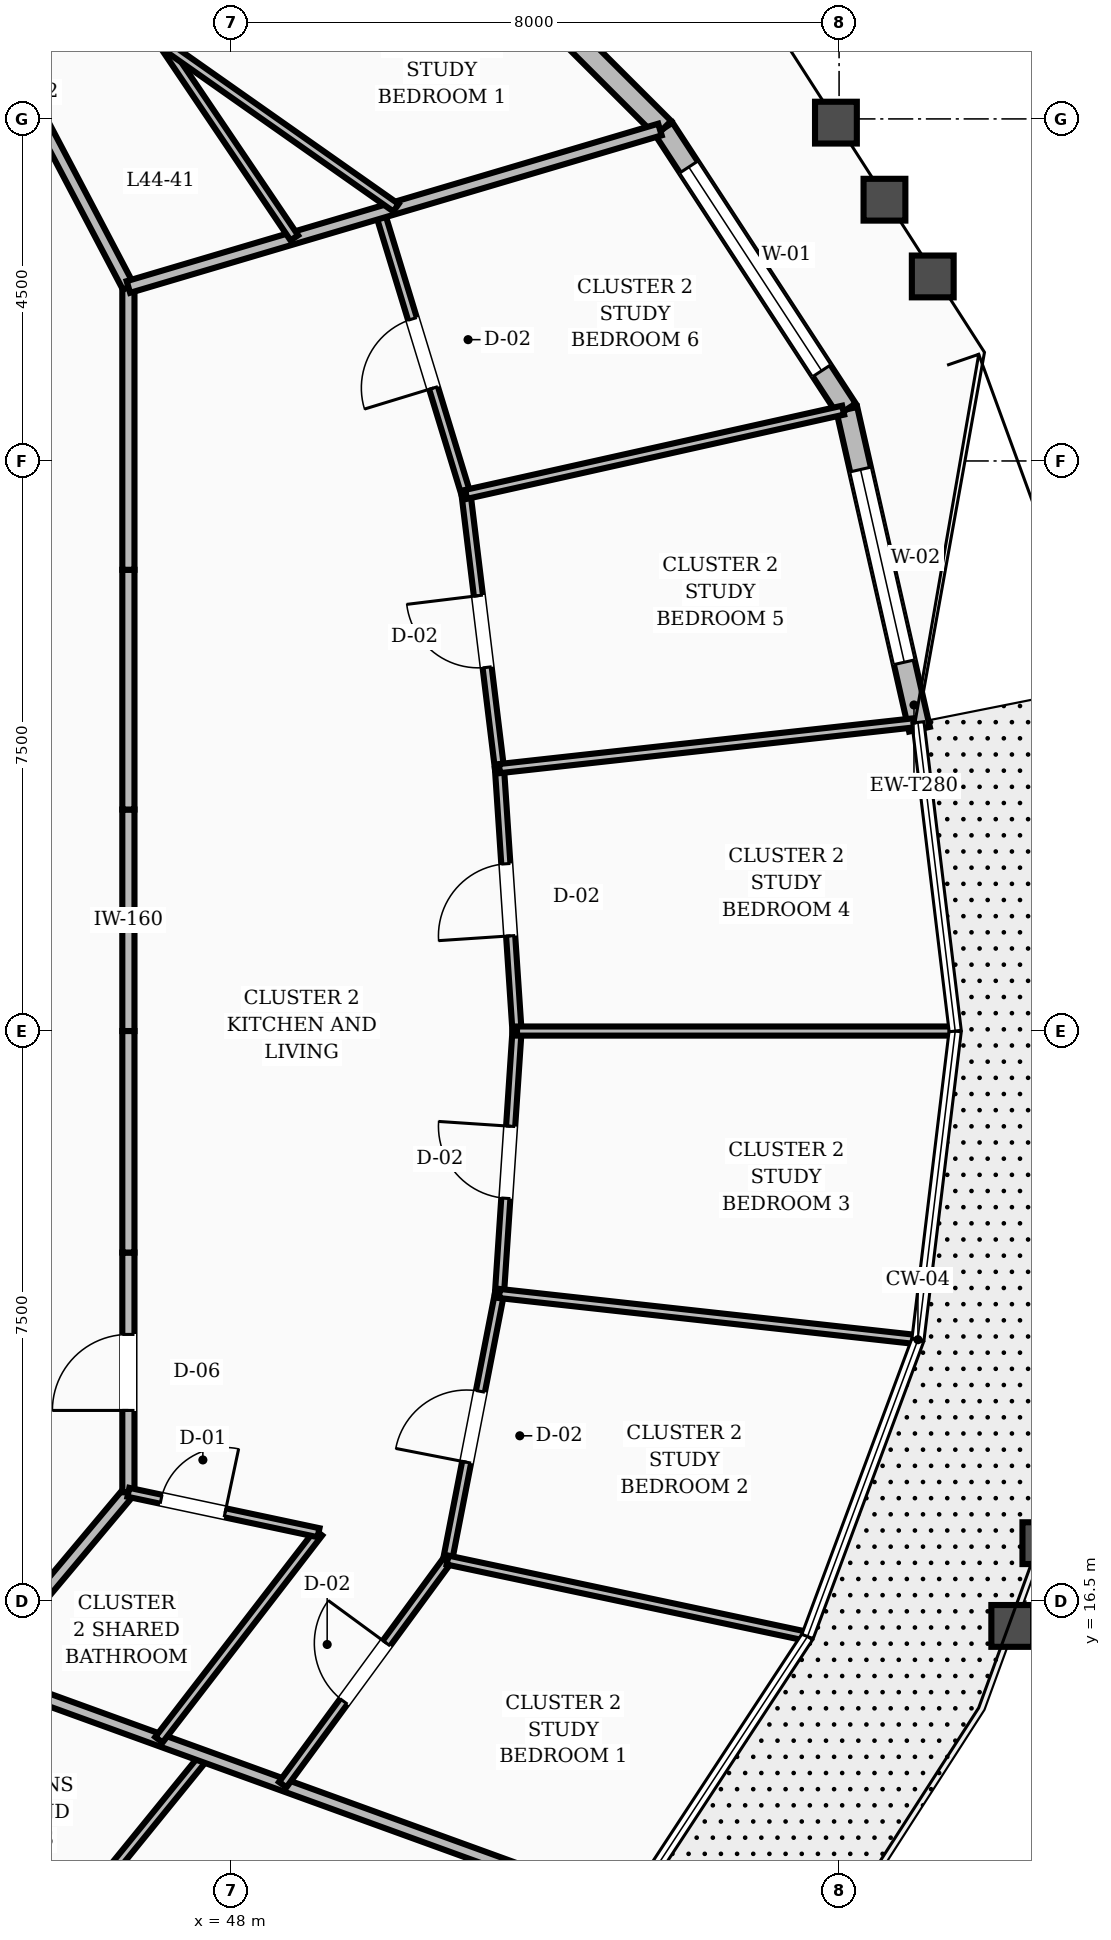
"""IFC4 building model, lengths in metres.
Left out: names, types, materials, properties, quantities, classifications, styles, units other than length and angle.
Written with IfcOpenShell. Run it as: python <this file> out.ifc"""

import sys

from ifc_helpers import new_model, si_unit, direction, frame, frame_2d, origin, place, context, subcontext, project, spatial, rectangle, extrude, element, fill, save


model = new_model("IFC4")
c1 = context("Model", 3, precision=1e-05, world=origin(), true_north=direction((0.0, 1.0)))
c2 = subcontext(c1, "Body", "Model", "MODEL_VIEW")
j1 = project(units=[si_unit("LENGTHUNIT", "METRE"), si_unit("PLANEANGLEUNIT", "RADIAN")], contexts=[c1])
p1 = place(None, origin())
s1 = spatial("IfcSite", under=j1, at=p1, CompositionType="ELEMENT")
p2 = place(p1, origin())
s2 = spatial("IfcBuilding", under=s1, at=p2, CompositionType="ELEMENT")
p3 = place(p2, frame((0.0, 0.0, 171.2)))
s3 = spatial("IfcBuildingStorey", under=s2, at=p3, CompositionType="ELEMENT", Elevation=171.2)
p4 = place(p3, frame((57.058, 27.971, 0.0), z_axis=(0.0, 0.0, 1.0), x_axis=(-0.221420598178, 0.975178403525, 0.0)))
e1 = element("IfcWall", 1, at=p4, inside=s3, PredefinedType="STANDARD", context=c2, shape_type="SweptSolid", body=[
    extrude(rectangle(XDim=4.316, YDim=0.28, at=frame_2d((2.158, 0.0))), origin(), (0.0, 0.0, 1.0), 2.82),
])
p5 = place(p4, frame((0.904, 0.0, 0.8)))
e2 = element("IfcOpeningElement", 2, at=p5, cuts=e1, PredefinedType="OPENING", context=c2, shape_type="SweptSolid", body=[
    extrude(rectangle(XDim=2.6, YDim=1.65, at=frame_2d((1.3, 0.825))), frame((0.0, 0.15, 0.0), z_axis=(0.0, -1.0, 0.0), x_axis=(1.0, 0.0, 0.0)), (0.0, 0.0, 1.0), 0.3),
])
p6 = place(p3, frame((56.102, 32.179, 0.0), z_axis=(0.0, 0.0, 1.0), x_axis=(-0.546411241489, 0.837517017841, 0.0)))
e3 = element("IfcWall", 3, at=p6, inside=s3, PredefinedType="STANDARD", context=c2, shape_type="SweptSolid", body=[
    extrude(rectangle(XDim=4.412, YDim=0.28, at=frame_2d((2.206, 0.0))), origin(), (0.0, 0.0, 1.0), 2.82),
])
p7 = place(p6, frame((0.606, 0.0, 0.8)))
e4 = element("IfcOpeningElement", 4, at=p7, cuts=e3, PredefinedType="OPENING", context=c2, shape_type="SweptSolid", body=[
    extrude(rectangle(XDim=3.2, YDim=1.65, at=frame_2d((1.6, 0.825))), frame((0.0, 0.15, 0.0), z_axis=(0.0, -1.0, 0.0), x_axis=(1.0, 0.0, 0.0)), (0.0, 0.0, 1.0), 0.3),
])
p8 = place(p3, frame((53.691, 35.875, 0.0), z_axis=(0.0, 0.0, 1.0), x_axis=(-0.707692376563, 0.706520700443, 0.0)))
e5 = element("IfcWall", 5, at=p8, inside=s3, PredefinedType="STANDARD", context=c2, shape_type="SweptSolid", body=[
    extrude(rectangle(XDim=4.584, YDim=0.28, at=frame_2d((2.292, 0.0))), origin(), (0.0, 0.0, 1.0), 2.82),
])
p9 = place(p3, frame((46.65, 24.0, 0.0), z_axis=(0.0, 0.0, 1.0), x_axis=(0.0, 1.0, 0.0)))
e6 = element("IfcWall", 6, at=p9, inside=s3, PredefinedType="SOLIDWALL", context=c2, shape_type="SweptSolid", body=[
    extrude(rectangle(XDim=2.914, YDim=0.16, at=frame_2d((1.457, 0.0))), origin(), (0.0, 0.0, 1.0), 2.8),
])
p10 = place(p3, frame((46.65, 26.914, 0.0), z_axis=(0.0, 0.0, 1.0), x_axis=(0.0, 1.0, 0.0)))
e7 = element("IfcWall", 7, at=p10, inside=s3, PredefinedType="SOLIDWALL", context=c2, shape_type="SweptSolid", body=[
    extrude(rectangle(XDim=3.154, YDim=0.16, at=frame_2d((1.577, 0.0))), origin(), (0.0, 0.0, 1.0), 2.8),
])
p11 = place(p3, frame((46.65, 30.068, 0.0), z_axis=(0.0, 0.0, 1.0), x_axis=(0.0, 1.0, 0.0)))
e8 = element("IfcWall", 8, at=p11, inside=s3, PredefinedType="SOLIDWALL", context=c2, shape_type="SweptSolid", body=[
    extrude(rectangle(XDim=3.721, YDim=0.16, at=frame_2d((1.86, 0.0))), origin(), (0.0, 0.0, 1.0), 2.8),
])
p12 = place(p3, frame((46.65, 33.789, 0.0), z_axis=(0.0, 0.0, 1.0), x_axis=(-0.46527115782, 0.885168204185, 0.0)))
e9 = element("IfcWall", 9, at=p12, inside=s3, PredefinedType="SOLIDWALL", context=c2, shape_type="SweptSolid", body=[
    extrude(rectangle(XDim=3.6, YDim=0.16, at=frame_2d((1.8, 0.0))), origin(), (0.0, 0.0, 1.0), 2.8),
])
p13 = place(p3, frame((44.65, 15.548, 0.0), z_axis=(0.0, 0.0, 1.0), x_axis=(0.642665742791, 0.76614668507, 0.0)))
e10 = element("IfcWall", 10, at=p13, inside=s3, PredefinedType="SOLIDWALL", context=c2, shape_type="SweptSolid", body=[
    extrude(rectangle(XDim=3.112, YDim=0.16, at=frame_2d((1.556, 0.0))), origin(), (0.0, 0.0, 1.0), 2.8),
])
p14 = place(p3, frame((46.65, 17.932, 0.0), z_axis=(0.0, 0.0, 1.0), x_axis=(0.0, 1.0, 0.0)))
e11 = element("IfcWall", 11, at=p14, inside=s3, PredefinedType="SOLIDWALL", context=c2, shape_type="SweptSolid", body=[
    extrude(rectangle(XDim=3.154, YDim=0.16, at=frame_2d((1.577, 0.0))), origin(), (0.0, 0.0, 1.0), 2.8),
])
p15 = place(p14, frame((1.077, 0.0, 0.0)))
e12 = element("IfcOpeningElement", 12, at=p15, cuts=e11, PredefinedType="OPENING", context=c2, shape_type="SweptSolid", body=[
    extrude(rectangle(XDim=1.0, YDim=2.1, at=frame_2d((0.5, 1.05))), frame((0.0, 0.09, 0.0), z_axis=(0.0, -1.0, 0.0), x_axis=(1.0, 0.0, 0.0)), (0.0, 0.0, 1.0), 0.18),
])
p16 = place(p3, frame((46.65, 21.086, 0.0), z_axis=(0.0, 0.0, 1.0), x_axis=(0.0, 1.0, 0.0)))
e13 = element("IfcWall", 13, at=p16, inside=s3, PredefinedType="SOLIDWALL", context=c2, shape_type="SweptSolid", body=[
    extrude(rectangle(XDim=2.914, YDim=0.16, at=frame_2d((1.457, 0.0))), origin(), (0.0, 0.0, 1.0), 2.8),
])
p17 = place(p3, frame((45.435, 11.731, 0.0), z_axis=(0.0, 0.0, 1.0), x_axis=(0.630658007355, 0.776060872457, 0.0)))
e14 = element("IfcWall", 14, at=p17, inside=s3, PredefinedType="PARTITIONING", context=c2, shape_type="SweptSolid", body=[
    extrude(rectangle(XDim=3.514, YDim=0.12, at=frame_2d((1.757, 0.0))), origin(), (0.0, 0.0, 1.0), 2.8),
])
p18 = place(p3, frame((44.65, 15.548, 0.0), z_axis=(0.0, 0.0, 1.0), x_axis=(0.940054778658, -0.341023478844, 0.0)))
e15 = element("IfcWall", 15, at=p18, inside=s3, PredefinedType="SOLIDWALL", context=c2, shape_type="SweptSolid", body=[
    extrude(rectangle(XDim=9.073, YDim=0.16, at=frame_2d((4.536, 0.0))), origin(), (0.0, 0.0, 1.0), 2.8),
])
p19 = place(p3, frame((47.051, 14.677, 0.0), z_axis=(0.0, 0.0, 1.0), x_axis=(0.61059875391, 0.791940125087, 0.0)))
e16 = element("IfcWall", 16, at=p19, inside=s3, PredefinedType="PARTITIONING", context=c2, shape_type="SweptSolid", body=[
    extrude(rectangle(XDim=3.44, YDim=0.12, at=frame_2d((1.72, 0.0))), origin(), (0.0, 0.0, 1.0), 2.8),
])
p20 = place(p3, frame((46.65, 17.932, 0.0), z_axis=(0.0, 0.0, 1.0), x_axis=(0.978187712371, -0.207722890809, 0.0)))
e17 = element("IfcWall", 17, at=p20, inside=s3, PredefinedType="PARTITIONING", context=c2, shape_type="SweptSolid", body=[
    extrude(rectangle(XDim=2.557, YDim=0.12, at=frame_2d((1.279, 0.0))), origin(), (0.0, 0.0, 1.0), 2.8),
])
p21 = place(p20, frame((0.44, 0.0, 0.0)))
e18 = element("IfcOpeningElement", 18, at=p21, cuts=e17, PredefinedType="OPENING", context=c2, shape_type="SweptSolid", body=[
    extrude(rectangle(XDim=0.86, YDim=2.1, at=frame_2d((0.43, 1.05))), frame((0.0, 0.07, 0.0), z_axis=(0.0, -1.0, 0.0), x_axis=(1.0, 0.0, 0.0)), (0.0, 0.0, 1.0), 0.14),
])
p22 = place(p3, frame((48.68, 14.085, 0.0), z_axis=(0.0, 0.0, 1.0), x_axis=(0.591730322107, 0.806135984744, 0.0)))
e19 = element("IfcWall", 19, at=p22, inside=s3, PredefinedType="PARTITIONING", context=c2, shape_type="SweptSolid", body=[
    extrude(rectangle(XDim=3.666, YDim=0.12, at=frame_2d((1.833, 0.0))), origin(), (0.0, 0.0, 1.0), 2.8),
])
p23 = place(p22, frame((1.358, 0.0, 0.0)))
e20 = element("IfcOpeningElement", 20, at=p23, cuts=e19, PredefinedType="OPENING", context=c2, shape_type="SweptSolid", body=[
    extrude(rectangle(XDim=0.95, YDim=2.1, at=frame_2d((0.475, 1.05))), frame((0.0, 0.07, 0.0), z_axis=(0.0, -1.0, 0.0), x_axis=(1.0, 0.0, 0.0)), (0.0, 0.0, 1.0), 0.14),
])
p24 = place(p3, frame((50.849, 17.04, 0.0), z_axis=(0.0, 0.0, 1.0), x_axis=(0.191067194274, 0.981576959424, 0.0)))
e21 = element("IfcWall", 21, at=p24, inside=s3, PredefinedType="PARTITIONING", context=c2, shape_type="SweptSolid", body=[
    extrude(rectangle(XDim=3.573, YDim=0.12, at=frame_2d((1.786, 0.0))), origin(), (0.0, 0.0, 1.0), 2.8),
])
p25 = place(p24, frame((1.311, 0.0, 0.0)))
e22 = element("IfcOpeningElement", 22, at=p25, cuts=e21, PredefinedType="OPENING", context=c2, shape_type="SweptSolid", body=[
    extrude(rectangle(XDim=0.95, YDim=2.1, at=frame_2d((0.475, 1.05))), frame((0.0, 0.07, 0.0), z_axis=(0.0, -1.0, 0.0), x_axis=(1.0, 0.0, 0.0)), (0.0, 0.0, 1.0), 0.14),
])
p26 = place(p3, frame((50.849, 17.04, 0.0), z_axis=(0.0, 0.0, 1.0), x_axis=(0.978199629962, -0.207666761766, 0.0)))
e23 = element("IfcWall", 23, at=p26, inside=s3, PredefinedType="PARTITIONING", context=c2, shape_type="SweptSolid", body=[
    extrude(rectangle(XDim=4.791, YDim=0.12, at=frame_2d((2.396, 0.0))), origin(), (0.0, 0.0, 1.0), 2.8),
])
p27 = place(p3, frame((51.532, 20.547, 0.0), z_axis=(0.0, 0.0, 1.0), x_axis=(0.066668848455, 0.99777515736, 0.0)))
e24 = element("IfcWall", 24, at=p27, inside=s3, PredefinedType="PARTITIONING", context=c2, shape_type="SweptSolid", body=[
    extrude(rectangle(XDim=3.461, YDim=0.12, at=frame_2d((1.73, 0.0))), origin(), (0.0, 0.0, 1.0), 2.8),
])
p28 = place(p27, frame((1.255, 0.0, 0.0)))
e25 = element("IfcOpeningElement", 25, at=p28, cuts=e24, PredefinedType="OPENING", context=c2, shape_type="SweptSolid", body=[
    extrude(rectangle(XDim=0.95, YDim=2.1, at=frame_2d((0.475, 1.05))), frame((0.0, 0.07, 0.0), z_axis=(0.0, -1.0, 0.0), x_axis=(1.0, 0.0, 0.0)), (0.0, 0.0, 1.0), 0.14),
])
p29 = place(p3, frame((51.532, 20.547, 0.0), z_axis=(0.0, 0.0, 1.0), x_axis=(0.993965909691, -0.109689426891, 0.0)))
e26 = element("IfcWall", 26, at=p29, inside=s3, PredefinedType="PARTITIONING", context=c2, shape_type="SweptSolid", body=[
    extrude(rectangle(XDim=5.489, YDim=0.12, at=frame_2d((2.744, 0.0))), origin(), (0.0, 0.0, 1.0), 2.8),
])
p30 = place(p3, frame((51.763, 24.0, 0.0), z_axis=(0.0, 0.0, 1.0), x_axis=(-0.066668848455, 0.99777515736, 0.0)))
e27 = element("IfcWall", 27, at=p30, inside=s3, PredefinedType="PARTITIONING", context=c2, shape_type="SweptSolid", body=[
    extrude(rectangle(XDim=3.461, YDim=0.12, at=frame_2d((1.73, 0.0))), origin(), (0.0, 0.0, 1.0), 2.8),
])
p31 = place(p30, frame((1.255, 0.0, 0.0)))
e28 = element("IfcOpeningElement", 28, at=p31, cuts=e27, PredefinedType="OPENING", context=c2, shape_type="SweptSolid", body=[
    extrude(rectangle(XDim=0.95, YDim=2.1, at=frame_2d((0.475, 1.05))), frame((0.0, 0.07, 0.0), z_axis=(0.0, -1.0, 0.0), x_axis=(1.0, 0.0, 0.0)), (0.0, 0.0, 1.0), 0.14),
])
p32 = place(p3, frame((51.763, 24.0, 0.0), z_axis=(0.0, 0.0, 1.0), x_axis=(1.0, 0.0, 0.0)))
e29 = element("IfcWall", 29, at=p32, inside=s3, PredefinedType="PARTITIONING", context=c2, shape_type="SweptSolid", body=[
    extrude(rectangle(XDim=5.715, YDim=0.12, at=frame_2d((2.857, 0.0))), origin(), (0.0, 0.0, 1.0), 2.8),
])
p33 = place(p3, frame((51.532, 27.453, 0.0), z_axis=(0.0, 0.0, 1.0), x_axis=(-0.120991408466, 0.992653554407, 0.0)))
e30 = element("IfcWall", 30, at=p33, inside=s3, PredefinedType="PARTITIONING", context=c2, shape_type="SweptSolid", body=[
    extrude(rectangle(XDim=3.634, YDim=0.12, at=frame_2d((1.817, 0.0))), origin(), (0.0, 0.0, 1.0), 2.8),
])
p34 = place(p33, frame((1.342, 0.0, 0.0)))
e31 = element("IfcOpeningElement", 31, at=p34, cuts=e30, PredefinedType="OPENING", context=c2, shape_type="SweptSolid", body=[
    extrude(rectangle(XDim=0.95, YDim=2.1, at=frame_2d((0.475, 1.05))), frame((0.0, 0.07, 0.0), z_axis=(0.0, -1.0, 0.0), x_axis=(1.0, 0.0, 0.0)), (0.0, 0.0, 1.0), 0.14),
])
p35 = place(p3, frame((51.532, 27.453, 0.0), z_axis=(0.0, 0.0, 1.0), x_axis=(0.993965909691, 0.109689426891, 0.0)))
e32 = element("IfcWall", 32, at=p35, inside=s3, PredefinedType="PARTITIONING", context=c2, shape_type="SweptSolid", body=[
    extrude(rectangle(XDim=5.489, YDim=0.12, at=frame_2d((2.744, 0.0))), origin(), (0.0, 0.0, 1.0), 2.8),
])
p36 = place(p3, frame((51.092, 31.06, 0.0), z_axis=(0.0, 0.0, 1.0), x_axis=(-0.292120966116, 0.956381378507, 0.0)))
e33 = element("IfcWall", 33, at=p36, inside=s3, PredefinedType="PARTITIONING", context=c2, shape_type="SweptSolid", body=[
    extrude(rectangle(XDim=3.878, YDim=0.12, at=frame_2d((1.939, 0.0))), origin(), (0.0, 0.0, 1.0), 2.8),
])
p37 = place(p36, frame((1.464, 0.0, 0.0)))
e34 = element("IfcOpeningElement", 34, at=p37, cuts=e33, PredefinedType="OPENING", context=c2, shape_type="SweptSolid", body=[
    extrude(rectangle(XDim=0.95, YDim=2.1, at=frame_2d((0.475, 1.05))), frame((0.0, 0.07, 0.0), z_axis=(0.0, -1.0, 0.0), x_axis=(1.0, 0.0, 0.0)), (0.0, 0.0, 1.0), 0.14),
])
p38 = place(p3, frame((51.092, 31.06, 0.0), z_axis=(0.0, 0.0, 1.0), x_axis=(0.9759480209, 0.218003349747, 0.0)))
e35 = element("IfcWall", 35, at=p38, inside=s3, PredefinedType="PARTITIONING", context=c2, shape_type="SweptSolid", body=[
    extrude(rectangle(XDim=5.083, YDim=0.12, at=frame_2d((2.542, 0.0))), origin(), (0.0, 0.0, 1.0), 2.8),
])
p39 = place(p3, frame((46.65, 33.789, 0.0), z_axis=(0.0, 0.0, 1.0), x_axis=(0.958820059034, 0.284014250337, 0.0)))
e36 = element("IfcWall", 36, at=p39, inside=s3, PredefinedType="SOLIDWALL", context=c2, shape_type="SweptSolid", body=[
    extrude(rectangle(XDim=7.294, YDim=0.16, at=frame_2d((3.647, 0.0))), origin(), (0.0, 0.0, 1.0), 2.8),
])
p40 = place(p3, frame((48.833, 34.435, 0.0), z_axis=(0.0, 0.0, 1.0), x_axis=(-0.559401227458, 0.828897018162, 0.0)))
e37 = element("IfcWall", 37, at=p40, inside=s3, PredefinedType="PARTITIONING", context=c2, shape_type="SweptSolid", body=[
    extrude(rectangle(XDim=3.864, YDim=0.12, at=frame_2d((1.932, 0.0))), origin(), (0.0, 0.0, 1.0), 2.8),
])
p41 = place(p3, frame((50.171, 34.832, 0.0), z_axis=(0.0, 0.0, 1.0), x_axis=(-0.81799193286, 0.57522969132, 0.0)))
e38 = element("IfcWall", 38, at=p41, inside=s3, PredefinedType="PARTITIONING", context=c2, shape_type="SweptSolid", body=[
    extrude(rectangle(XDim=8.004, YDim=0.12, at=frame_2d((4.002, 0.0))), origin(), (0.0, 0.0, 1.0), 2.8),
])
p42 = place(p41, frame((4.885, 0.0, 0.0)))
e39 = element("IfcOpeningElement", 39, at=p42, cuts=e38, PredefinedType="OPENING", context=c2, shape_type="SweptSolid", body=[
    extrude(rectangle(XDim=0.95, YDim=2.1, at=frame_2d((0.475, 1.05))), frame((0.0, 0.07, 0.0), z_axis=(0.0, -1.0, 0.0), x_axis=(1.0, 0.0, 0.0)), (0.0, 0.0, 1.0), 0.14),
])
p43 = place(p5, origin())
e40 = element("IfcWindow", 40, at=p43, inside=s3, PartitioningType="SINGLE_PANEL", PredefinedType="WINDOW", context=c2, shape_type="SweptSolid", body=[
    extrude(rectangle(XDim=2.6, YDim=1.65, at=frame_2d((1.3, 0.825))), frame((0.0, 0.03, 0.0), z_axis=(0.0, -1.0, 0.0), x_axis=(1.0, 0.0, 0.0)), (0.0, 0.0, 1.0), 0.06),
])
fill(e2, e40)
p44 = place(p7, origin())
e41 = element("IfcWindow", 41, at=p44, inside=s3, PartitioningType="SINGLE_PANEL", PredefinedType="WINDOW", context=c2, shape_type="SweptSolid", body=[
    extrude(rectangle(XDim=3.2, YDim=1.65, at=frame_2d((1.6, 0.825))), frame((0.0, 0.03, 0.0), z_axis=(0.0, -1.0, 0.0), x_axis=(1.0, 0.0, 0.0)), (0.0, 0.0, 1.0), 0.06),
])
fill(e4, e41)
p45 = place(p21, origin())
e42 = element("IfcDoor", 42, at=p45, inside=s3, OperationType="SINGLE_SWING_RIGHT", PredefinedType="DOOR", context=c2, shape_type="SweptSolid", body=[
    extrude(rectangle(XDim=0.86, YDim=2.1, at=frame_2d((0.43, 1.05))), frame((0.0, 0.025, 0.0), z_axis=(0.0, -1.0, 0.0), x_axis=(1.0, 0.0, 0.0)), (0.0, 0.0, 1.0), 0.05),
])
fill(e18, e42)
p46 = place(p15, origin())
e43 = element("IfcDoor", 43, at=p46, inside=s3, OperationType="SINGLE_SWING_LEFT", PredefinedType="DOOR", context=c2, shape_type="SweptSolid", body=[
    extrude(rectangle(XDim=1.0, YDim=2.1, at=frame_2d((0.5, 1.05))), frame((0.0, 0.025, 0.0), z_axis=(0.0, -1.0, 0.0), x_axis=(1.0, 0.0, 0.0)), (0.0, 0.0, 1.0), 0.05),
])
fill(e12, e43)
p47 = place(p23, origin())
e44 = element("IfcDoor", 44, at=p47, inside=s3, OperationType="SINGLE_SWING_RIGHT", PredefinedType="DOOR", context=c2, shape_type="SweptSolid", body=[
    extrude(rectangle(XDim=0.95, YDim=2.1, at=frame_2d((0.475, 1.05))), frame((0.0, 0.025, 0.0), z_axis=(0.0, -1.0, 0.0), x_axis=(1.0, 0.0, 0.0)), (0.0, 0.0, 1.0), 0.05),
])
fill(e20, e44)
p48 = place(p25, origin())
e45 = element("IfcDoor", 45, at=p48, inside=s3, OperationType="SINGLE_SWING_LEFT", PredefinedType="DOOR", context=c2, shape_type="SweptSolid", body=[
    extrude(rectangle(XDim=0.95, YDim=2.1, at=frame_2d((0.475, 1.05))), frame((0.0, 0.025, 0.0), z_axis=(0.0, -1.0, 0.0), x_axis=(1.0, 0.0, 0.0)), (0.0, 0.0, 1.0), 0.05),
])
fill(e22, e45)
p49 = place(p28, origin())
e46 = element("IfcDoor", 46, at=p49, inside=s3, OperationType="SINGLE_SWING_RIGHT", PredefinedType="DOOR", context=c2, shape_type="SweptSolid", body=[
    extrude(rectangle(XDim=0.95, YDim=2.1, at=frame_2d((0.475, 1.05))), frame((0.0, 0.025, 0.0), z_axis=(0.0, -1.0, 0.0), x_axis=(1.0, 0.0, 0.0)), (0.0, 0.0, 1.0), 0.05),
])
fill(e25, e46)
p50 = place(p31, origin())
e47 = element("IfcDoor", 47, at=p50, inside=s3, OperationType="SINGLE_SWING_LEFT", PredefinedType="DOOR", context=c2, shape_type="SweptSolid", body=[
    extrude(rectangle(XDim=0.95, YDim=2.1, at=frame_2d((0.475, 1.05))), frame((0.0, 0.025, 0.0), z_axis=(0.0, -1.0, 0.0), x_axis=(1.0, 0.0, 0.0)), (0.0, 0.0, 1.0), 0.05),
])
fill(e28, e47)
p51 = place(p34, origin())
e48 = element("IfcDoor", 48, at=p51, inside=s3, OperationType="SINGLE_SWING_RIGHT", PredefinedType="DOOR", context=c2, shape_type="SweptSolid", body=[
    extrude(rectangle(XDim=0.95, YDim=2.1, at=frame_2d((0.475, 1.05))), frame((0.0, 0.025, 0.0), z_axis=(0.0, -1.0, 0.0), x_axis=(1.0, 0.0, 0.0)), (0.0, 0.0, 1.0), 0.05),
])
fill(e31, e48)
p52 = place(p37, origin())
e49 = element("IfcDoor", 49, at=p52, inside=s3, OperationType="SINGLE_SWING_LEFT", PredefinedType="DOOR", context=c2, shape_type="SweptSolid", body=[
    extrude(rectangle(XDim=0.95, YDim=2.1, at=frame_2d((0.475, 1.05))), frame((0.0, 0.025, 0.0), z_axis=(0.0, -1.0, 0.0), x_axis=(1.0, 0.0, 0.0)), (0.0, 0.0, 1.0), 0.05),
])
fill(e34, e49)
save(model, sys.argv[1])
